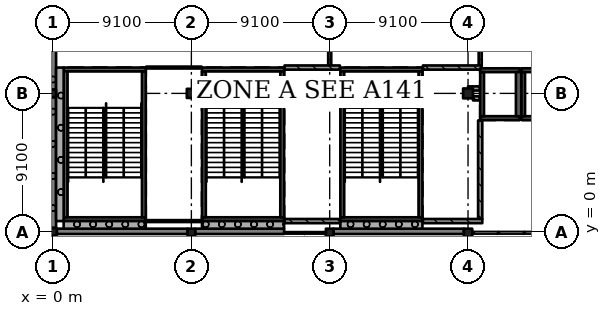
"""IFC4 building model, lengths in metres.
Left out: names, types, materials, properties, quantities, classifications, styles, units other than length and angle.
Written with IfcOpenShell. Run it as: python <this file> out.ifc"""

import sys

from ifc_helpers import new_model, si_unit, direction, frame, frame_2d, origin, origin_2d, place, context, subcontext, project, spatial, rectangle, extrude, element, fill, save


model = new_model("IFC4")
c1 = context("Model", 3, precision=1e-05, world=origin(), true_north=direction((0.0, 1.0)))
c2 = subcontext(c1, "Body", "Model", "MODEL_VIEW")
j1 = project(units=[si_unit("LENGTHUNIT", "METRE"), si_unit("PLANEANGLEUNIT", "RADIAN")], contexts=[c1])
p1 = place(None, origin())
s1 = spatial("IfcSite", under=j1, at=p1, CompositionType="ELEMENT")
p2 = place(p1, origin())
s2 = spatial("IfcBuilding", under=s1, at=p2, CompositionType="ELEMENT")
p3 = place(p2, frame((0.0, 0.0, 15.47)))
s3 = spatial("IfcBuildingStorey", under=s2, at=p3, CompositionType="ELEMENT", Elevation=15.47)
for number, where, z_axis, x_axis in (
    (1, (0.0, 0.0, 0.0), (0.0, 0.0, 1.0), (1.0, 0.0, 0.0)),
    (2, (-0.05, 9.1, 0.0), (0.0, 0.0, 1.0), (1.0, 0.0, 0.0)),
    (3, (9.1, -0.05, 0.0), (0.0, 0.0, 1.0), (1.0, 0.0, 0.0)),
):
    element("IfcColumn", number, at=place(p3, frame(where, z_axis=z_axis, x_axis=x_axis)), inside=s3, PredefinedType="COLUMN", context=c2, shape_type="SweptSolid", body=[
        extrude(rectangle(XDim=0.5, YDim=0.5, at=origin_2d()), origin(), (0.0, 0.0, 1.0), 4.55),
    ])
p4 = place(p3, frame((9.1, 9.1, 0.0), z_axis=(0.0, 0.0, 1.0), x_axis=(1.0, 0.0, 0.0)))
e4 = element("IfcColumn", 4, at=p4, inside=s3, PredefinedType="COLUMN", context=c2, shape_type="SweptSolid", body=[
    extrude(rectangle(XDim=0.6, YDim=0.6, at=origin_2d()), origin(), (0.0, 0.0, 1.0), 4.55),
])
p5 = place(p3, frame((18.2, -0.05, 0.0), z_axis=(0.0, 0.0, 1.0), x_axis=(1.0, 0.0, 0.0)))
e5 = element("IfcColumn", 5, at=p5, inside=s3, PredefinedType="COLUMN", context=c2, shape_type="SweptSolid", body=[
    extrude(rectangle(XDim=0.5, YDim=0.5, at=origin_2d()), origin(), (0.0, 0.0, 1.0), 4.55),
])
p6 = place(p3, frame((18.2, 9.1, 0.0), z_axis=(0.0, 0.0, 1.0), x_axis=(1.0, 0.0, 0.0)))
e6 = element("IfcColumn", 6, at=p6, inside=s3, PredefinedType="COLUMN", context=c2, shape_type="SweptSolid", body=[
    extrude(rectangle(XDim=0.6, YDim=0.6, at=origin_2d()), origin(), (0.0, 0.0, 1.0), 4.55),
])
p7 = place(p3, frame((27.3, -0.075, 0.0), z_axis=(0.0, 0.0, 1.0), x_axis=(1.0, 0.0, 0.0)))
e7 = element("IfcColumn", 7, at=p7, inside=s3, PredefinedType="COLUMN", context=c2, shape_type="SweptSolid", body=[
    extrude(rectangle(XDim=0.55, YDim=0.55, at=origin_2d()), origin(), (0.0, 0.0, 1.0), 4.55),
])
p8 = place(p3, frame((27.3, 9.1, 0.0), z_axis=(0.0, 0.0, 1.0), x_axis=(1.0, 0.0, 0.0)))
e8 = element("IfcColumn", 8, at=p8, inside=s3, PredefinedType="COLUMN", context=c2, shape_type="SweptSolid", body=[
    extrude(rectangle(XDim=0.65, YDim=0.65, at=origin_2d()), origin(), (0.0, 0.0, 1.0), 4.55),
])
p9 = place(p3, frame((30.7, 7.475, 0.0), z_axis=(0.0, 0.0, 1.0), x_axis=(-1.0, 0.0, 0.0)))
e9 = element("IfcWall", 9, at=p9, inside=s3, PredefinedType="SHEAR", context=c2, shape_type="SweptSolid", body=[
    extrude(rectangle(XDim=2.6, YDim=0.25, at=frame_2d((1.3, 0.0))), origin(), (0.0, 0.0, 1.0), 4.55),
])
p10 = place(p3, frame((30.7, 10.625, 0.0), z_axis=(0.0, 0.0, 1.0), x_axis=(-1.0, 0.0, 0.0)))
e10 = element("IfcWall", 10, at=p10, inside=s3, PredefinedType="SHEAR", context=c2, shape_type="SweptSolid", body=[
    extrude(rectangle(XDim=2.6, YDim=0.25, at=frame_2d((1.3, 0.0))), origin(), (0.0, 0.0, 1.0), 4.55),
])
p11 = place(p10, frame((0.8, 0.0, 0.0)))
e11 = element("IfcOpeningElement", 11, at=p11, cuts=e10, PredefinedType="OPENING", context=c2, shape_type="SweptSolid", body=[
    extrude(rectangle(XDim=1.0, YDim=2.1, at=frame_2d((0.5, 1.05))), frame((0.0, 0.135, 0.0), z_axis=(0.0, -1.0, 0.0), x_axis=(1.0, 0.0, 0.0)), (0.0, 0.0, 1.0), 0.27),
])
p12 = place(p3, frame((28.225, 10.5, 0.0), z_axis=(0.0, 0.0, 1.0), x_axis=(0.0, -1.0, 0.0)))
e12 = element("IfcWall", 12, at=p12, inside=s3, PredefinedType="SHEAR", context=c2, shape_type="SweptSolid", body=[
    extrude(rectangle(XDim=2.9, YDim=0.25, at=frame_2d((1.45, 0.0))), origin(), (0.0, 0.0, 1.0), 4.55),
])
p13 = place(p3, frame((30.625, 10.5, 0.0), z_axis=(0.0, 0.0, 1.0), x_axis=(0.0, -1.0, 0.0)))
e13 = element("IfcWall", 13, at=p13, inside=s3, PredefinedType="SHEAR", context=c2, shape_type="SweptSolid", body=[
    extrude(rectangle(XDim=2.9, YDim=0.35, at=frame_2d((1.45, 0.0))), origin(), (0.0, 0.0, 1.0), 4.55),
])
p14 = place(p3, frame((33.4, 7.475, 0.0), z_axis=(0.0, 0.0, 1.0), x_axis=(-1.0, 0.0, 0.0)))
e14 = element("IfcWall", 14, at=p14, inside=s3, PredefinedType="SHEAR", context=c2, shape_type="SweptSolid", body=[
    extrude(rectangle(XDim=2.6, YDim=0.25, at=frame_2d((1.3, 0.0))), origin(), (0.0, 0.0, 1.0), 4.55),
])
p15 = place(p3, frame((33.4, 10.625, 0.0), z_axis=(0.0, 0.0, 1.0), x_axis=(-1.0, 0.0, 0.0)))
e15 = element("IfcWall", 15, at=p15, inside=s3, PredefinedType="SHEAR", context=c2, shape_type="SweptSolid", body=[
    extrude(rectangle(XDim=2.6, YDim=0.25, at=frame_2d((1.3, 0.0))), origin(), (0.0, 0.0, 1.0), 4.55),
])
p16 = place(p15, frame((0.8, 0.0, 0.0)))
e16 = element("IfcOpeningElement", 16, at=p16, cuts=e15, PredefinedType="OPENING", context=c2, shape_type="SweptSolid", body=[
    extrude(rectangle(XDim=1.0, YDim=2.1, at=frame_2d((0.5, 1.05))), frame((0.0, 0.135, 0.0), z_axis=(0.0, -1.0, 0.0), x_axis=(1.0, 0.0, 0.0)), (0.0, 0.0, 1.0), 0.27),
])
p17 = place(p3, frame((30.925, 10.5, 0.0), z_axis=(0.0, 0.0, 1.0), x_axis=(0.0, -1.0, 0.0)))
e17 = element("IfcWall", 17, at=p17, inside=s3, PredefinedType="SHEAR", context=c2, shape_type="SweptSolid", body=[
    extrude(rectangle(XDim=2.9, YDim=0.25, at=frame_2d((1.45, 0.0))), origin(), (0.0, 0.0, 1.0), 4.55),
])
p18 = place(p3, frame((6.1, 0.825, 0.0), z_axis=(0.0, 0.0, 1.0), x_axis=(-1.0, 0.0, 0.0)))
e18 = element("IfcWall", 18, at=p18, inside=s3, PredefinedType="SHEAR", context=c2, shape_type="SweptSolid", body=[
    extrude(rectangle(XDim=5.4, YDim=0.25, at=frame_2d((2.7, 0.0))), origin(), (0.0, 0.0, 1.0), 4.55),
])
p19 = place(p3, frame((6.1, 10.675, 0.0), z_axis=(0.0, 0.0, 1.0), x_axis=(-1.0, 0.0, 0.0)))
e19 = element("IfcWall", 19, at=p19, inside=s3, PredefinedType="SHEAR", context=c2, shape_type="SweptSolid", body=[
    extrude(rectangle(XDim=5.4, YDim=0.25, at=frame_2d((2.7, 0.0))), origin(), (0.0, 0.0, 1.0), 4.55),
])
p20 = place(p19, frame((1.5, 0.0, 0.0)))
e20 = element("IfcOpeningElement", 20, at=p20, cuts=e19, PredefinedType="OPENING", context=c2, shape_type="SweptSolid", body=[
    extrude(rectangle(XDim=2.4, YDim=2.1, at=frame_2d((1.2, 1.05))), frame((0.0, 0.135, 0.0), z_axis=(0.0, -1.0, 0.0), x_axis=(1.0, 0.0, 0.0)), (0.0, 0.0, 1.0), 0.27),
])
for number, where, z_axis, x_axis in (
    (21, (0.825, 10.55, 0.0), (0.0, 0.0, 1.0), (0.0, -1.0, 0.0)),
    (22, (5.975, 10.55, 0.0), (0.0, 0.0, 1.0), (0.0, -1.0, 0.0)),
):
    element("IfcWall", number, at=place(p3, frame(where, z_axis=z_axis, x_axis=x_axis)), inside=s3, PredefinedType="SHEAR", context=c2, shape_type="SweptSolid", body=[
        extrude(rectangle(XDim=9.6, YDim=0.25, at=frame_2d((4.8, 0.0))), origin(), (0.0, 0.0, 1.0), 4.55),
    ])
p21 = place(p3, frame((15.2, 0.825, 0.0), z_axis=(0.0, 0.0, 1.0), x_axis=(-1.0, 0.0, 0.0)))
e23 = element("IfcWall", 23, at=p21, inside=s3, PredefinedType="SHEAR", context=c2, shape_type="SweptSolid", body=[
    extrude(rectangle(XDim=5.4, YDim=0.25, at=frame_2d((2.7, 0.0))), origin(), (0.0, 0.0, 1.0), 4.55),
])
p22 = place(p3, frame((15.2, 10.675, 0.0), z_axis=(0.0, 0.0, 1.0), x_axis=(-1.0, 0.0, 0.0)))
e24 = element("IfcWall", 24, at=p22, inside=s3, PredefinedType="SHEAR", context=c2, shape_type="SweptSolid", body=[
    extrude(rectangle(XDim=5.4, YDim=0.25, at=frame_2d((2.7, 0.0))), origin(), (0.0, 0.0, 1.0), 4.55),
])
p23 = place(p22, frame((1.5, 0.0, 0.0)))
e25 = element("IfcOpeningElement", 25, at=p23, cuts=e24, PredefinedType="OPENING", context=c2, shape_type="SweptSolid", body=[
    extrude(rectangle(XDim=2.4, YDim=2.1, at=frame_2d((1.2, 1.05))), frame((0.0, 0.135, 0.0), z_axis=(0.0, -1.0, 0.0), x_axis=(1.0, 0.0, 0.0)), (0.0, 0.0, 1.0), 0.27),
])
for number, where, z_axis, x_axis in (
    (26, (9.925, 10.55, 0.0), (0.0, 0.0, 1.0), (0.0, -1.0, 0.0)),
    (27, (15.075, 10.55, 0.0), (0.0, 0.0, 1.0), (0.0, -1.0, 0.0)),
):
    element("IfcWall", number, at=place(p3, frame(where, z_axis=z_axis, x_axis=x_axis)), inside=s3, PredefinedType="SHEAR", context=c2, shape_type="SweptSolid", body=[
        extrude(rectangle(XDim=9.6, YDim=0.25, at=frame_2d((4.8, 0.0))), origin(), (0.0, 0.0, 1.0), 4.55),
    ])
p24 = place(p3, frame((24.3, 0.825, 0.0), z_axis=(0.0, 0.0, 1.0), x_axis=(-1.0, 0.0, 0.0)))
e28 = element("IfcWall", 28, at=p24, inside=s3, PredefinedType="SHEAR", context=c2, shape_type="SweptSolid", body=[
    extrude(rectangle(XDim=5.4, YDim=0.25, at=frame_2d((2.7, 0.0))), origin(), (0.0, 0.0, 1.0), 4.55),
])
p25 = place(p3, frame((24.3, 10.675, 0.0), z_axis=(0.0, 0.0, 1.0), x_axis=(-1.0, 0.0, 0.0)))
e29 = element("IfcWall", 29, at=p25, inside=s3, PredefinedType="SHEAR", context=c2, shape_type="SweptSolid", body=[
    extrude(rectangle(XDim=5.4, YDim=0.25, at=frame_2d((2.7, 0.0))), origin(), (0.0, 0.0, 1.0), 4.55),
])
p26 = place(p25, frame((1.5, 0.0, 0.0)))
e30 = element("IfcOpeningElement", 30, at=p26, cuts=e29, PredefinedType="OPENING", context=c2, shape_type="SweptSolid", body=[
    extrude(rectangle(XDim=2.4, YDim=2.1, at=frame_2d((1.2, 1.05))), frame((0.0, 0.135, 0.0), z_axis=(0.0, -1.0, 0.0), x_axis=(1.0, 0.0, 0.0)), (0.0, 0.0, 1.0), 0.27),
])
for number, where, z_axis, x_axis in (
    (31, (19.025, 10.55, 0.0), (0.0, 0.0, 1.0), (0.0, -1.0, 0.0)),
    (32, (24.175, 10.55, 0.0), (0.0, 0.0, 1.0), (0.0, -1.0, 0.0)),
):
    element("IfcWall", number, at=place(p3, frame(where, z_axis=z_axis, x_axis=x_axis)), inside=s3, PredefinedType="SHEAR", context=c2, shape_type="SweptSolid", body=[
        extrude(rectangle(XDim=9.6, YDim=0.25, at=frame_2d((4.8, 0.0))), origin(), (0.0, 0.0, 1.0), 4.55),
    ])
p27 = place(p3, frame((0.25, 0.025, 0.0), z_axis=(0.0, 0.0, 1.0), x_axis=(1.0, 0.0, 0.0)))
e33 = element("IfcWall", 33, at=p27, inside=s3, PredefinedType="SOLIDWALL", context=c2, shape_type="SweptSolid", body=[
    extrude(rectangle(XDim=8.6, YDim=0.35, at=frame_2d((4.3, 0.0))), origin(), (0.0, 0.0, 1.0), 3.55),
])
p28 = place(p3, frame((9.35, 0.025, 0.0), z_axis=(0.0, 0.0, 1.0), x_axis=(1.0, 0.0, 0.0)))
e34 = element("IfcWall", 34, at=p28, inside=s3, PredefinedType="SOLIDWALL", context=c2, shape_type="SweptSolid", body=[
    extrude(rectangle(XDim=5.85, YDim=0.35, at=frame_2d((2.925, 0.0))), origin(), (0.0, 0.0, 1.0), 3.55),
])
p29 = place(p3, frame((18.45, 0.025, 0.0), z_axis=(0.0, 0.0, 1.0), x_axis=(1.0, 0.0, 0.0)))
e35 = element("IfcWall", 35, at=p29, inside=s3, PredefinedType="SOLIDWALL", context=c2, shape_type="SweptSolid", body=[
    extrude(rectangle(XDim=8.575, YDim=0.35, at=frame_2d((4.288, 0.0))), origin(), (0.0, 0.0, 1.0), 3.55),
])
p30 = place(p3, frame((0.025, 17.9, 0.0), z_axis=(0.0, 0.0, 1.0), x_axis=(0.0, -1.0, 0.0)))
e36 = element("IfcWall", 36, at=p30, inside=s3, PredefinedType="SOLIDWALL", context=c2, shape_type="SweptSolid", body=[
    extrude(rectangle(XDim=8.55, YDim=0.35, at=frame_2d((4.275, 0.0))), origin(), (0.0, 0.0, 1.0), 3.55),
])
p31 = place(p3, frame((0.025, 8.85, 0.0), z_axis=(0.0, 0.0, 1.0), x_axis=(0.0, -1.0, 0.0)))
e37 = element("IfcWall", 37, at=p31, inside=s3, PredefinedType="SOLIDWALL", context=c2, shape_type="SweptSolid", body=[
    extrude(rectangle(XDim=8.6, YDim=0.35, at=frame_2d((4.3, 0.0))), origin(), (0.0, 0.0, 1.0), 3.55),
])
p32 = place(p3, frame((0.7, 0.45, 0.0), z_axis=(0.0, 0.0, 1.0), x_axis=(1.0, 0.0, 0.0)))
e38 = element("IfcWall", 38, at=p32, inside=s3, PredefinedType="SOLIDWALL", context=c2, shape_type="SweptSolid", body=[
    extrude(rectangle(XDim=5.4, YDim=0.5, at=frame_2d((2.7, 0.0))), origin(), (0.0, 0.0, 1.0), 4.3),
])
p33 = place(p3, frame((0.45, 0.7, 0.0), z_axis=(0.0, 0.0, 1.0), x_axis=(0.0, 1.0, 0.0)))
e39 = element("IfcWall", 39, at=p33, inside=s3, PredefinedType="SOLIDWALL", context=c2, shape_type="SweptSolid", body=[
    extrude(rectangle(XDim=10.1, YDim=0.5, at=frame_2d((5.05, 0.0))), origin(), (0.0, 0.0, 1.0), 4.3),
])
p34 = place(p3, frame((9.8, 0.45, 0.0), z_axis=(0.0, 0.0, 1.0), x_axis=(1.0, 0.0, 0.0)))
e40 = element("IfcWall", 40, at=p34, inside=s3, PredefinedType="SOLIDWALL", context=c2, shape_type="SweptSolid", body=[
    extrude(rectangle(XDim=5.4, YDim=0.5, at=frame_2d((2.7, 0.0))), origin(), (0.0, 0.0, 1.0), 4.3),
])
p35 = place(p3, frame((18.9, 0.45, 0.0), z_axis=(0.0, 0.0, 1.0), x_axis=(1.0, 0.0, 0.0)))
e41 = element("IfcWall", 41, at=p35, inside=s3, PredefinedType="SOLIDWALL", context=c2, shape_type="SweptSolid", body=[
    extrude(rectangle(XDim=5.4, YDim=0.5, at=frame_2d((2.7, 0.0))), origin(), (0.0, 0.0, 1.0), 4.3),
])
p36 = place(p3, frame((9.4, 8.8, 0.0), z_axis=(0.0, 0.0, 1.0), x_axis=(1.0, 0.0, 0.0)))
e42 = element("IfcWall", 42, at=p36, inside=s3, PredefinedType="PARTITIONING", context=c2, shape_type="SweptSolid", body=[
    extrude(rectangle(XDim=0.37, YDim=0.125, at=frame_2d((0.185, 0.0))), origin(), (0.0, 0.0, 1.0), 4.3),
])
p37 = place(p3, frame((9.77, 0.7, 0.0), z_axis=(0.0, 0.0, 1.0), x_axis=(-1.0, 0.0, 0.0)))
e43 = element("IfcWall", 43, at=p37, inside=s3, PredefinedType="PARTITIONING", context=c2, shape_type="SweptSolid", body=[
    extrude(rectangle(XDim=3.64, YDim=0.125, at=frame_2d((1.82, 0.0))), origin(), (0.0, 0.0, 1.0), 4.3),
])
p38 = place(p3, frame((9.77, 9.4, 0.0), z_axis=(0.0, 0.0, 1.0), x_axis=(-1.0, 0.0, 0.0)))
e44 = element("IfcWall", 44, at=p38, inside=s3, PredefinedType="PARTITIONING", context=c2, shape_type="SweptSolid", body=[
    extrude(rectangle(XDim=0.37, YDim=0.125, at=frame_2d((0.185, 0.0))), origin(), (0.0, 0.0, 1.0), 4.3),
])
p39 = place(p3, frame((9.77, 10.8, 0.0), z_axis=(0.0, 0.0, 1.0), x_axis=(-1.0, 0.0, 0.0)))
e45 = element("IfcWall", 45, at=p39, inside=s3, PredefinedType="PARTITIONING", context=c2, shape_type="SweptSolid", body=[
    extrude(rectangle(XDim=3.64, YDim=0.125, at=frame_2d((1.82, 0.0))), origin(), (0.0, 0.0, 1.0), 4.3),
])
p40 = place(p39, frame((1.35, 0.0, 0.0)))
e46 = element("IfcOpeningElement", 46, at=p40, cuts=e45, PredefinedType="OPENING", context=c2, shape_type="SweptSolid", body=[
    extrude(rectangle(XDim=0.9, YDim=2.1, at=frame_2d((0.45, 1.05))), frame((0.0, 0.073, 0.0), z_axis=(0.0, -1.0, 0.0), x_axis=(1.0, 0.0, 0.0)), (0.0, 0.0, 1.0), 0.145),
])
p41 = place(p3, frame((18.2, 9.4, 0.0), z_axis=(0.0, 0.0, 1.0), x_axis=(1.0, 0.0, 0.0)))
e47 = element("IfcWall", 47, at=p41, inside=s3, PredefinedType="SOLIDWALL", context=c2, shape_type="SweptSolid", body=[
    extrude(rectangle(XDim=0.67, YDim=0.275, at=frame_2d((0.335, 0.0))), origin(), (0.0, 0.0, 1.0), 4.3),
])
p42 = place(p3, frame((15.23, 10.8, 0.0), z_axis=(0.0, 0.0, 1.0), x_axis=(1.0, 0.0, 0.0)))
e48 = element("IfcWall", 48, at=p42, inside=s3, PredefinedType="SOLIDWALL", context=c2, shape_type="SweptSolid", body=[
    extrude(rectangle(XDim=3.64, YDim=0.275, at=frame_2d((1.82, 0.0))), origin(), (0.0, 0.0, 1.0), 4.3),
])
p43 = place(p42, frame((0.92, 0.0, 0.0)))
e49 = element("IfcOpeningElement", 49, at=p43, cuts=e48, PredefinedType="OPENING", context=c2, shape_type="SweptSolid", body=[
    extrude(rectangle(XDim=1.2, YDim=2.4, at=frame_2d((0.6, 1.2))), frame((0.0, 0.147, 0.0), z_axis=(0.0, -1.0, 0.0), x_axis=(1.0, 0.0, 0.0)), (0.0, 0.0, 1.0), 0.295),
])
p44 = place(p3, frame((18.2, 17.85, 0.0), z_axis=(0.0, 0.0, 1.0), x_axis=(0.0, -1.0, 0.0)))
e50 = element("IfcWall", 50, at=p44, inside=s3, PredefinedType="PARTITIONING", context=c2, shape_type="SweptSolid", body=[
    extrude(rectangle(XDim=6.913, YDim=0.2, at=frame_2d((3.456, 0.0))), origin(), (0.0, 0.0, 1.0), 3.55),
])
p45 = place(p44, frame((0.85, 0.0, 0.0)))
e51 = element("IfcOpeningElement", 51, at=p45, cuts=e50, PredefinedType="OPENING", context=c2, shape_type="SweptSolid", body=[
    extrude(rectangle(XDim=1.8, YDim=2.4, at=frame_2d((0.9, 1.2))), frame((0.0, 0.11, 0.0), z_axis=(0.0, -1.0, 0.0), x_axis=(1.0, 0.0, 0.0)), (0.0, 0.0, 1.0), 0.22),
])
p46 = place(p44, frame((4.25, 0.0, 0.0)))
e52 = element("IfcOpeningElement", 52, at=p46, cuts=e50, PredefinedType="OPENING", context=c2, shape_type="SweptSolid", body=[
    extrude(rectangle(XDim=1.8, YDim=2.4, at=frame_2d((0.9, 1.2))), frame((0.0, 0.11, 0.0), z_axis=(0.0, -1.0, 0.0), x_axis=(1.0, 0.0, 0.0)), (0.0, 0.0, 1.0), 0.22),
])
p47 = place(p3, frame((18.5, 8.8, 0.0), z_axis=(0.0, 0.0, 1.0), x_axis=(1.0, 0.0, 0.0)))
e53 = element("IfcWall", 53, at=p47, inside=s3, PredefinedType="SOLIDWALL", context=c2, shape_type="SweptSolid", body=[
    extrude(rectangle(XDim=0.37, YDim=0.275, at=frame_2d((0.185, 0.0))), origin(), (0.0, 0.0, 1.0), 4.3),
])
p48 = place(p3, frame((18.87, 0.7, 0.0), z_axis=(0.0, 0.0, 1.0), x_axis=(-1.0, 0.0, 0.0)))
e54 = element("IfcWall", 54, at=p48, inside=s3, PredefinedType="SOLIDWALL", context=c2, shape_type="SweptSolid", body=[
    extrude(rectangle(XDim=3.64, YDim=0.275, at=frame_2d((1.82, 0.0))), origin(), (0.0, 0.0, 1.0), 4.3),
])
p49 = place(p3, frame((27.3, 9.425, 0.0), z_axis=(0.0, 0.0, 1.0), x_axis=(1.0, 0.0, 0.0)))
e55 = element("IfcWall", 55, at=p49, inside=s3, PredefinedType="SOLIDWALL", context=c2, shape_type="SweptSolid", body=[
    extrude(rectangle(XDim=0.77, YDim=0.275, at=frame_2d((0.385, 0.0))), origin(), (0.0, 0.0, 1.0), 4.3),
])
p50 = place(p3, frame((27.625, 8.775, 0.0), z_axis=(0.0, 0.0, 1.0), x_axis=(1.0, 0.0, 0.0)))
e56 = element("IfcWall", 56, at=p50, inside=s3, PredefinedType="SOLIDWALL", context=c2, shape_type="SweptSolid", body=[
    extrude(rectangle(XDim=0.445, YDim=0.275, at=frame_2d((0.223, 0.0))), origin(), (0.0, 0.0, 1.0), 4.3),
])
p51 = place(p3, frame((28.1, 7.32, 0.0), z_axis=(0.0, 0.0, 1.0), x_axis=(0.0, -1.0, 0.0)))
e57 = element("IfcWall", 57, at=p51, inside=s3, PredefinedType="SOLIDWALL", context=c2, shape_type="SweptSolid", body=[
    extrude(rectangle(XDim=6.483, YDim=0.275, at=frame_2d((3.241, 0.0))), origin(), (0.0, 0.0, 1.0), 4.3),
])
p52 = place(p3, frame((28.1, 13.7, 0.0), z_axis=(0.0, 0.0, 1.0), x_axis=(0.0, -1.0, 0.0)))
e58 = element("IfcWall", 58, at=p52, inside=s3, PredefinedType="PARTITIONING", context=c2, shape_type="SweptSolid", body=[
    extrude(rectangle(XDim=2.762, YDim=0.2, at=frame_2d((1.381, 0.0))), origin(), (0.0, 0.0, 1.0), 4.3),
])
p53 = place(p52, frame((0.45, 0.0, 0.0)))
e59 = element("IfcOpeningElement", 59, at=p53, cuts=e58, PredefinedType="OPENING", context=c2, shape_type="SweptSolid", body=[
    extrude(rectangle(XDim=1.8, YDim=2.4, at=frame_2d((0.9, 1.2))), frame((0.0, 0.11, 0.0), z_axis=(0.0, -1.0, 0.0), x_axis=(1.0, 0.0, 0.0)), (0.0, 0.0, 1.0), 0.22),
])
p54 = place(p3, frame((28.2, 10.8, 0.0), z_axis=(0.0, 0.0, 1.0), x_axis=(-1.0, 0.0, 0.0)))
e60 = element("IfcWall", 60, at=p54, inside=s3, PredefinedType="SOLIDWALL", context=c2, shape_type="SweptSolid", body=[
    extrude(rectangle(XDim=3.87, YDim=0.275, at=frame_2d((1.935, 0.0))), origin(), (0.0, 0.0, 1.0), 4.3),
])
p55 = place(p54, frame((1.35, 0.0, 0.0)))
e61 = element("IfcOpeningElement", 61, at=p55, cuts=e60, PredefinedType="OPENING", context=c2, shape_type="SweptSolid", body=[
    extrude(rectangle(XDim=1.2, YDim=2.4, at=frame_2d((0.6, 1.2))), frame((0.0, 0.147, 0.0), z_axis=(0.0, -1.0, 0.0), x_axis=(1.0, 0.0, 0.0)), (0.0, 0.0, 1.0), 0.295),
])
p56 = place(p3, frame((28.238, 0.7, 0.0), z_axis=(0.0, 0.0, 1.0), x_axis=(-1.0, 0.0, 0.0)))
e62 = element("IfcWall", 62, at=p56, inside=s3, PredefinedType="SOLIDWALL", context=c2, shape_type="SweptSolid", body=[
    extrude(rectangle(XDim=3.907, YDim=0.275, at=frame_2d((1.954, 0.0))), origin(), (0.0, 0.0, 1.0), 4.3),
])
p57 = place(p40, origin())
e63 = element("IfcDoor", 63, at=p57, inside=s3, OperationType="SINGLE_SWING_RIGHT", PredefinedType="DOOR", context=c2, shape_type="SweptSolid", body=[
    extrude(rectangle(XDim=0.9, YDim=2.1, at=frame_2d((0.45, 1.05))), frame((0.0, 0.025, 0.0), z_axis=(0.0, -1.0, 0.0), x_axis=(1.0, 0.0, 0.0)), (0.0, 0.0, 1.0), 0.05),
])
fill(e46, e63)
p58 = place(p43, origin())
e64 = element("IfcDoor", 64, at=p58, inside=s3, OperationType="SINGLE_SWING_RIGHT", PredefinedType="DOOR", context=c2, shape_type="SweptSolid", body=[
    extrude(rectangle(XDim=1.2, YDim=2.4, at=frame_2d((0.6, 1.2))), frame((0.0, 0.025, 0.0), z_axis=(0.0, -1.0, 0.0), x_axis=(1.0, 0.0, 0.0)), (0.0, 0.0, 1.0), 0.05),
])
fill(e49, e64)
p59 = place(p55, origin())
e65 = element("IfcDoor", 65, at=p59, inside=s3, OperationType="SINGLE_SWING_LEFT", PredefinedType="DOOR", context=c2, shape_type="SweptSolid", body=[
    extrude(rectangle(XDim=1.2, YDim=2.4, at=frame_2d((0.6, 1.2))), frame((0.0, 0.025, 0.0), z_axis=(0.0, -1.0, 0.0), x_axis=(1.0, 0.0, 0.0)), (0.0, 0.0, 1.0), 0.05),
])
fill(e61, e65)
p60 = place(p53, origin())
e66 = element("IfcDoor", 66, at=p60, inside=s3, OperationType="DOUBLE_DOOR_SINGLE_SWING", PredefinedType="DOOR", context=c2, shape_type="SweptSolid", body=[
    extrude(rectangle(XDim=1.8, YDim=2.4, at=frame_2d((0.9, 1.2))), frame((0.0, 0.025, 0.0), z_axis=(0.0, -1.0, 0.0), x_axis=(1.0, 0.0, 0.0)), (0.0, 0.0, 1.0), 0.05),
])
fill(e59, e66)
p61 = place(p20, origin())
e67 = element("IfcDoor", 67, at=p61, inside=s3, OperationType="DOUBLE_DOOR_SINGLE_SWING", PredefinedType="DOOR", context=c2, shape_type="SweptSolid", body=[
    extrude(rectangle(XDim=2.4, YDim=2.1, at=frame_2d((1.2, 1.05))), frame((0.0, 0.025, 0.0), z_axis=(0.0, -1.0, 0.0), x_axis=(1.0, 0.0, 0.0)), (0.0, 0.0, 1.0), 0.05),
])
fill(e20, e67)
p62 = place(p23, origin())
e68 = element("IfcDoor", 68, at=p62, inside=s3, OperationType="DOUBLE_DOOR_SINGLE_SWING", PredefinedType="DOOR", context=c2, shape_type="SweptSolid", body=[
    extrude(rectangle(XDim=2.4, YDim=2.1, at=frame_2d((1.2, 1.05))), frame((0.0, 0.025, 0.0), z_axis=(0.0, -1.0, 0.0), x_axis=(1.0, 0.0, 0.0)), (0.0, 0.0, 1.0), 0.05),
])
fill(e25, e68)
p63 = place(p26, origin())
e69 = element("IfcDoor", 69, at=p63, inside=s3, OperationType="DOUBLE_DOOR_SINGLE_SWING", PredefinedType="DOOR", context=c2, shape_type="SweptSolid", body=[
    extrude(rectangle(XDim=2.4, YDim=2.1, at=frame_2d((1.2, 1.05))), frame((0.0, 0.025, 0.0), z_axis=(0.0, -1.0, 0.0), x_axis=(1.0, 0.0, 0.0)), (0.0, 0.0, 1.0), 0.05),
])
fill(e30, e69)
p64 = place(p11, origin())
e70 = element("IfcDoor", 70, at=p64, inside=s3, OperationType="DOUBLE_DOOR_SLIDING", PredefinedType="DOOR", context=c2, shape_type="SweptSolid", body=[
    extrude(rectangle(XDim=1.0, YDim=2.1, at=frame_2d((0.5, 1.05))), frame((0.0, 0.025, 0.0), z_axis=(0.0, -1.0, 0.0), x_axis=(1.0, 0.0, 0.0)), (0.0, 0.0, 1.0), 0.05),
])
fill(e11, e70)
save(model, sys.argv[1])
